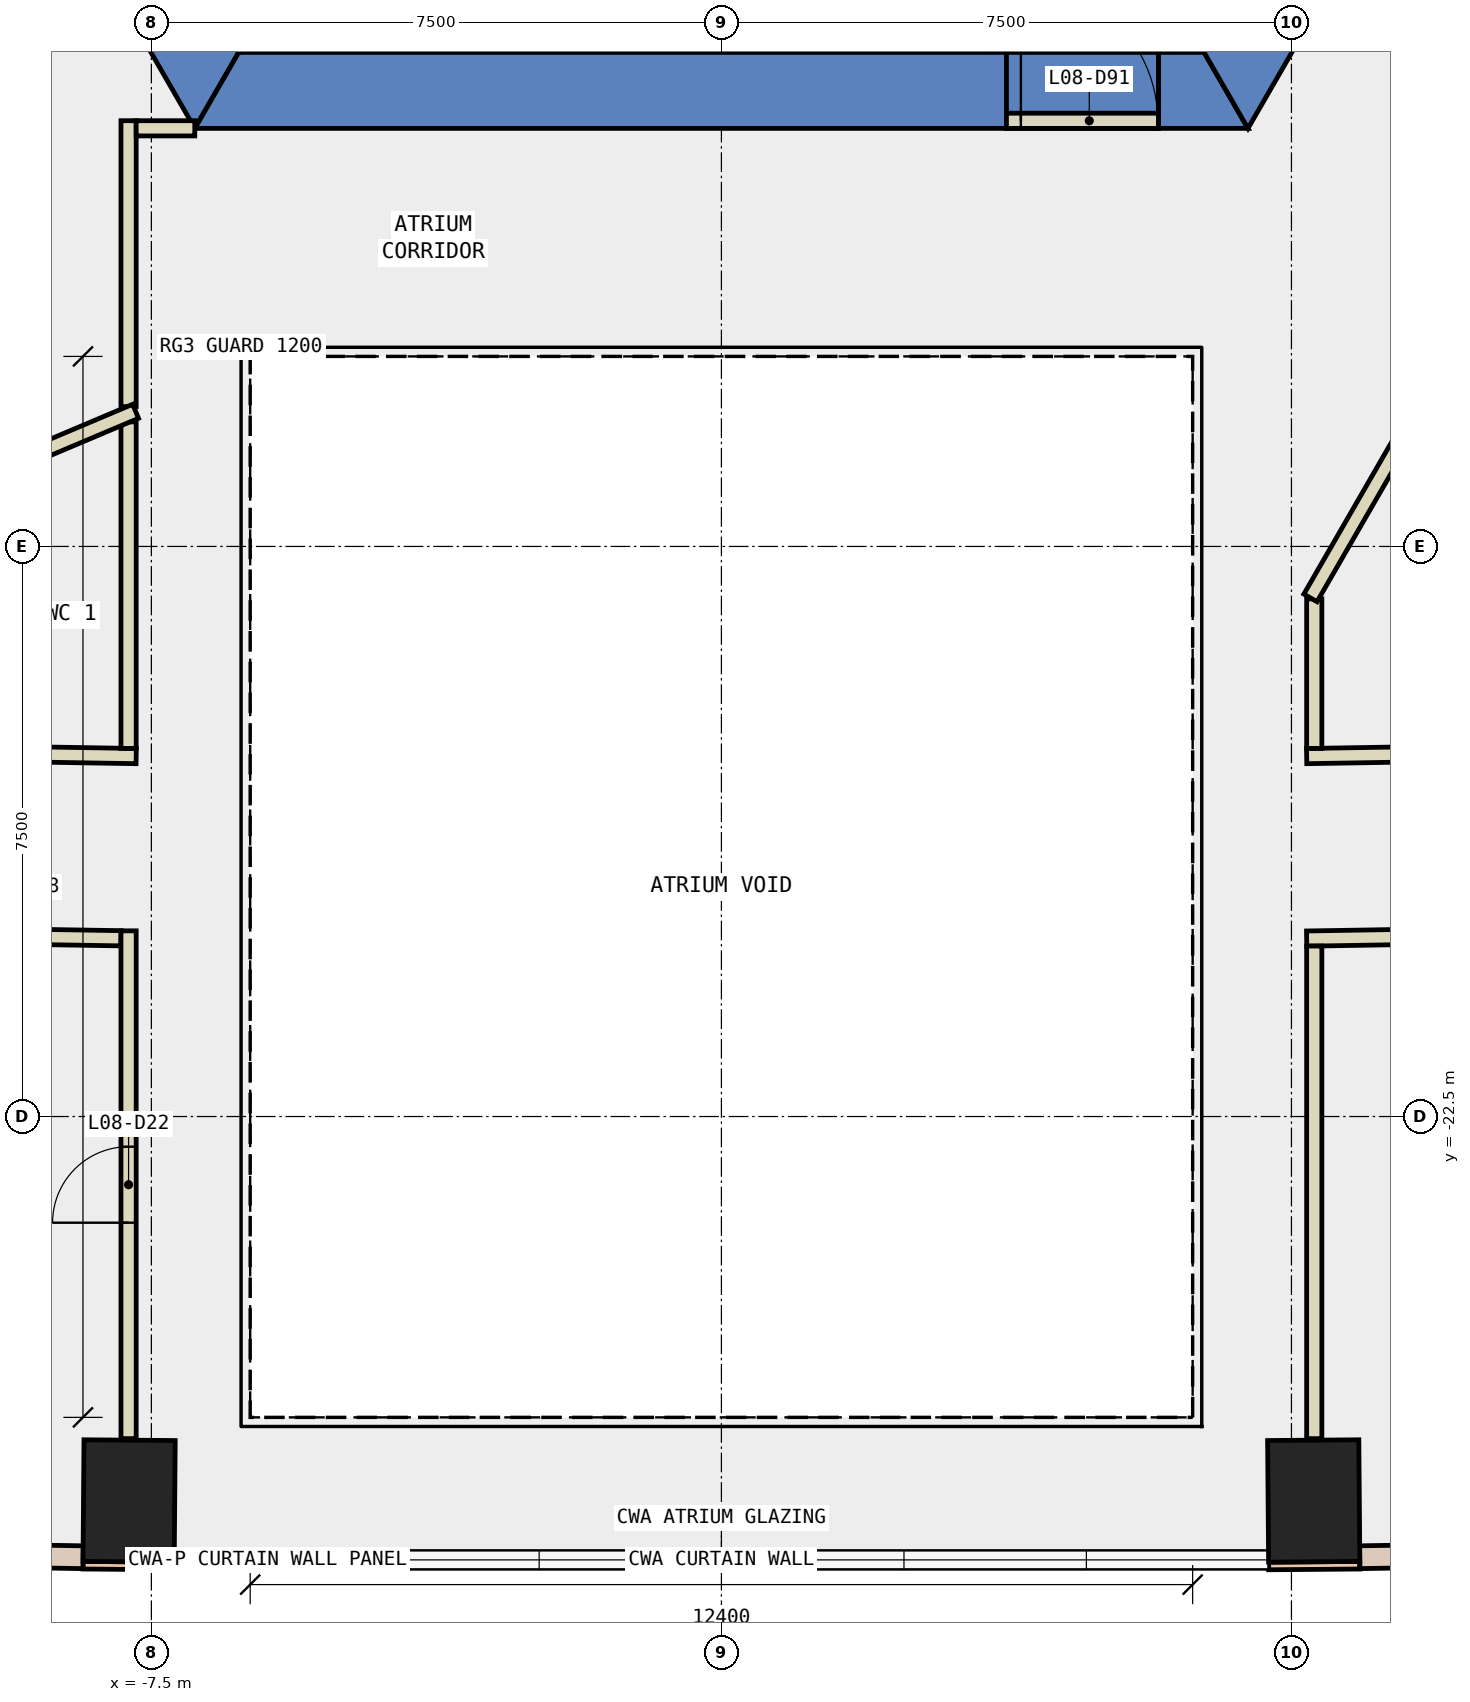
"""IFC4 building model, lengths in metres.
Left out: names, types, materials, properties, quantities, classifications, styles, units other than length and angle.
Written with IfcOpenShell. Run it as: python <this file> out.ifc"""

import sys

from ifc_helpers import new_model, si_unit, direction, frame, frame_2d, origin, origin_2d, place, context, subcontext, project, spatial, polyline, rectangle, outline, extrude, element, fill, save


model = new_model("IFC4")
c1 = context("Model", 3, precision=1e-05, world=origin(), true_north=direction((0.0, 1.0)))
c2 = subcontext(c1, "Body", "Model", "MODEL_VIEW")
j1 = project(units=[si_unit("LENGTHUNIT", "METRE"), si_unit("PLANEANGLEUNIT", "RADIAN")], contexts=[c1])
p1 = place(None, origin())
s1 = spatial("IfcSite", under=j1, at=p1, CompositionType="ELEMENT")
p2 = place(p1, origin())
s2 = spatial("IfcBuilding", under=s1, at=p2, CompositionType="ELEMENT")
p3 = place(p2, frame((0.0, 0.0, 43.4)))
s3 = spatial("IfcBuildingStorey", under=s2, at=p3, CompositionType="ELEMENT", Elevation=43.4)
for number, where, z_axis, x_axis in (
    (1, (-7.793, -27.558, -0.4), (0.0, 0.0, 1.0), (-1.0, 0.008, 0.0)),
    (2, (7.793, -27.558, -0.4), (0.0, 0.0, 1.0), (1.0, 0.008, 0.0)),
):
    element("IfcColumn", number, at=place(p3, frame(where, z_axis=z_axis, x_axis=x_axis)), inside=s3, PredefinedType="COLUMN", context=c2, shape_type="SweptSolid", body=[
        extrude(rectangle(XDim=1.2, YDim=1.6, at=origin_2d()), origin(), (0.0, 0.0, 1.0), 4.2),
    ])
p4 = place(p3, frame((0.0, 0.0, -0.4)))
e3 = element("IfcWall", 3, at=p4, inside=s3, PredefinedType="SHEAR", context=c2, shape_type="SweptSolid", body=[
    extrude(outline(polyline([(-13.856, 2.5), (-6.928, -9.5), (-6.351, -8.5), (-12.702, 2.5), (-13.856, 2.5)])), origin(), (0.0, 0.0, 1.0), 4.2),
])
p5 = place(p3, frame((0.0, 0.0, -0.4)))
e4 = element("IfcWall", 4, at=p5, inside=s3, PredefinedType="SHEAR", context=c2, shape_type="SweptSolid", body=[
    extrude(outline(polyline([(3.75, -9.5), (3.75, -8.5), (-6.351, -8.5), (-6.928, -9.5), (3.75, -9.5)])), origin(), (0.0, 0.0, 1.0), 4.2),
])
p6 = place(p3, frame((0.0, 0.0, -0.4)))
e5 = element("IfcWall", 5, at=p6, inside=s3, PredefinedType="SHEAR", context=c2, shape_type="SweptSolid", body=[
    extrude(outline(polyline([(5.75, -8.5), (5.75, -9.5), (6.928, -9.5), (6.351, -8.5), (5.75, -8.5)])), origin(), (0.0, 0.0, 1.0), 4.2),
])
p7 = place(p3, frame((0.0, 0.0, 3.6)))
e6 = element("IfcWall", 6, at=p7, inside=s3, PredefinedType="SHEAR", context=c2, shape_type="SweptSolid", body=[
    extrude(outline(polyline([(5.75, -9.5), (5.75, -8.5), (3.75, -8.5), (3.75, -9.5), (5.75, -9.5)])), origin(), (0.0, 0.0, 1.0), 0.2),
])
p8 = place(p3, frame((0.0, 0.0, -0.4)))
e7 = element("IfcWall", 7, at=p8, inside=s3, PredefinedType="SHEAR", context=c2, shape_type="SweptSolid", body=[
    extrude(outline(polyline([(8.117, -7.44), (7.252, -6.94), (6.351, -8.5), (6.928, -9.5), (8.117, -7.44)])), origin(), (0.0, 0.0, 1.0), 4.2),
])
for number, where, z_axis, x_axis in (
    (8, (-8.4, -28.403, 0.0), (0.0, 0.0, 1.0), (1.0, -0.008, 0.0)),
    (9, (7.2, -28.413, 0.0), (0.0, 0.0, 1.0), (1.0, 0.008, 0.0)),
):
    element("IfcWall", number, at=place(p3, frame(where, z_axis=z_axis, x_axis=x_axis)), inside=s3, PredefinedType="STANDARD", context=c2, shape_type="SweptSolid", body=[
        extrude(rectangle(XDim=1.2, YDim=0.1, at=frame_2d((0.6, 0.0))), origin(), (0.0, 0.0, 1.0), 3.8),
    ])
p9 = place(p3, frame((-15.568, -28.181, 0.0), z_axis=(0.0, 0.0, 1.0), x_axis=(0.999866467443, -0.016341581408, 0.0)))
e10 = element("IfcWall", 10, at=p9, inside=s3, PredefinedType="STANDARD", context=c2, shape_type="SweptSolid", body=[
    extrude(rectangle(XDim=7.171, YDim=0.3, at=frame_2d((3.585, 0.0))), origin(), (0.0, 0.0, 1.0), 3.8),
])
p10 = place(p9, frame((0.593, 0.0, 0.9)))
e11 = element("IfcOpeningElement", 11, at=p10, cuts=e10, PredefinedType="OPENING", context=c2, shape_type="SweptSolid", body=[
    extrude(rectangle(XDim=2.4, YDim=2.6, at=frame_2d((1.2, 1.3))), frame((0.0, 0.16, 0.0), z_axis=(0.0, -1.0, 0.0), x_axis=(1.0, 0.0, 0.0)), (0.0, 0.0, 1.0), 0.32),
])
p11 = place(p9, frame((4.178, 0.0, 0.9)))
e12 = element("IfcOpeningElement", 12, at=p11, cuts=e10, PredefinedType="OPENING", context=c2, shape_type="SweptSolid", body=[
    extrude(rectangle(XDim=2.4, YDim=2.6, at=frame_2d((1.2, 1.3))), frame((0.0, 0.16, 0.0), z_axis=(0.0, -1.0, 0.0), x_axis=(1.0, 0.0, 0.0)), (0.0, 0.0, 1.0), 0.32),
])
p12 = place(p3, frame((8.398, -28.298, 0.0), z_axis=(0.0, 0.0, 1.0), x_axis=(0.999866467443, 0.016341581408, 0.0)))
e13 = element("IfcWall", 13, at=p12, inside=s3, PredefinedType="STANDARD", context=c2, shape_type="SweptSolid", body=[
    extrude(rectangle(XDim=7.171, YDim=0.3, at=frame_2d((3.585, 0.0))), origin(), (0.0, 0.0, 1.0), 3.8),
])
p13 = place(p12, frame((0.593, 0.0, 0.9)))
e14 = element("IfcOpeningElement", 14, at=p13, cuts=e13, PredefinedType="OPENING", context=c2, shape_type="SweptSolid", body=[
    extrude(rectangle(XDim=2.4, YDim=2.6, at=frame_2d((1.2, 1.3))), frame((0.0, 0.16, 0.0), z_axis=(0.0, -1.0, 0.0), x_axis=(1.0, 0.0, 0.0)), (0.0, 0.0, 1.0), 0.32),
])
p14 = place(p12, frame((4.178, 0.0, 0.9)))
e15 = element("IfcOpeningElement", 15, at=p14, cuts=e13, PredefinedType="OPENING", context=c2, shape_type="SweptSolid", body=[
    extrude(rectangle(XDim=2.4, YDim=2.6, at=frame_2d((1.2, 1.3))), frame((0.0, 0.16, 0.0), z_axis=(0.0, -1.0, 0.0), x_axis=(1.0, 0.0, 0.0)), (0.0, 0.0, 1.0), 0.32),
])
p15 = place(p3, frame((7.7, -17.758, 0.0), z_axis=(0.0, 0.0, 1.0), x_axis=(0.999865574926, 0.016396099485, 0.0)))
e16 = element("IfcWall", 16, at=p15, inside=s3, PredefinedType="PARTITIONING", context=c2, shape_type="SweptSolid", body=[
    extrude(rectangle(XDim=8.234, YDim=0.2, at=frame_2d((4.117, 0.0))), origin(), (0.0, 0.0, 1.0), 3.8),
])
p16 = place(p3, frame((-15.73, -17.627, 0.0), z_axis=(0.0, 0.0, 1.0), x_axis=(0.999866746812, -0.016324479129, 0.0)))
e17 = element("IfcWall", 17, at=p16, inside=s3, PredefinedType="PARTITIONING", context=c2, shape_type="SweptSolid", body=[
    extrude(rectangle(XDim=8.031, YDim=0.2, at=frame_2d((4.016, 0.0))), origin(), (0.0, 0.0, 1.0), 3.8),
])
p17 = place(p16, frame((3.515, 0.0, 0.0)))
e18 = element("IfcOpeningElement", 18, at=p17, cuts=e17, PredefinedType="OPENING", context=c2, shape_type="SweptSolid", body=[
    extrude(rectangle(XDim=1.0, YDim=2.1, at=frame_2d((0.5, 1.05))), frame((0.0, 0.11, 0.0), z_axis=(0.0, -1.0, 0.0), x_axis=(1.0, 0.0, 0.0)), (0.0, 0.0, 1.0), 0.22),
])
p18 = place(p3, frame((16.061, -20.022, 0.0), z_axis=(0.0, 0.0, 1.0), x_axis=(-0.999865858466, -0.016378799504, 0.0)))
e19 = element("IfcWall", 19, at=p18, inside=s3, PredefinedType="PARTITIONING", context=c2, shape_type="SweptSolid", body=[
    extrude(rectangle(XDim=8.362, YDim=0.2, at=frame_2d((4.181, 0.0))), origin(), (0.0, 0.0, 1.0), 3.8),
])
p19 = place(p18, frame((3.681, 0.0, 0.0)))
e20 = element("IfcOpeningElement", 20, at=p19, cuts=e19, PredefinedType="OPENING", context=c2, shape_type="SweptSolid", body=[
    extrude(rectangle(XDim=1.0, YDim=2.1, at=frame_2d((0.5, 1.05))), frame((0.0, 0.11, 0.0), z_axis=(0.0, -1.0, 0.0), x_axis=(1.0, 0.0, 0.0)), (0.0, 0.0, 1.0), 0.22),
])
p20 = place(p3, frame((-7.9, -20.155, 0.0), z_axis=(0.0, 0.0, 1.0), x_axis=(-0.999867846419, 0.016256989184, 0.0)))
e21 = element("IfcWall", 21, at=p20, inside=s3, PredefinedType="PARTITIONING", context=c2, shape_type="SweptSolid", body=[
    extrude(rectangle(XDim=3.875, YDim=0.2, at=frame_2d((1.937, 0.0))), origin(), (0.0, 0.0, 1.0), 3.8),
])
p21 = place(p3, frame((7.8, -15.69, 0.0), z_axis=(0.0, 0.0, 1.0), x_axis=(0.0, -1.0, 0.0)))
e22 = element("IfcWall", 22, at=p21, inside=s3, PredefinedType="PARTITIONING", context=c2, shape_type="SweptSolid", body=[
    extrude(rectangle(XDim=1.967, YDim=0.2, at=frame_2d((0.983, 0.0))), origin(), (0.0, 0.0, 1.0), 3.8),
])
p22 = place(p3, frame((-7.8, -13.161, 0.0), z_axis=(0.0, 0.0, 1.0), x_axis=(0.0, 1.0, 0.0)))
e23 = element("IfcWall", 23, at=p22, inside=s3, PredefinedType="PARTITIONING", context=c2, shape_type="SweptSolid", body=[
    extrude(rectangle(XDim=3.762, YDim=0.2, at=frame_2d((1.881, 0.0))), origin(), (0.0, 0.0, 1.0), 3.8),
])
p23 = place(p3, frame((-7.7, -9.499, 0.0), z_axis=(0.0, 0.0, 1.0), x_axis=(1.0, 0.0, 0.0)))
e24 = element("IfcWall", 24, at=p23, inside=s3, PredefinedType="PARTITIONING", context=c2, shape_type="SweptSolid", body=[
    extrude(rectangle(XDim=0.771, YDim=0.2, at=frame_2d((0.385, 0.0))), origin(), (0.0, 0.0, 1.0), 3.8),
])
p24 = place(p3, frame((-7.8, -17.657, 0.0), z_axis=(0.0, 0.0, 1.0), x_axis=(0.0, 1.0, 0.0)))
e25 = element("IfcWall", 25, at=p24, inside=s3, PredefinedType="PARTITIONING", context=c2, shape_type="SweptSolid", body=[
    extrude(rectangle(XDim=4.296, YDim=0.2, at=frame_2d((2.148, 0.0))), origin(), (0.0, 0.0, 1.0), 3.8),
])
p25 = place(p3, frame((7.8, -20.257, 0.0), z_axis=(0.0, 0.0, 1.0), x_axis=(0.0, -1.0, 0.0)))
e26 = element("IfcWall", 26, at=p25, inside=s3, PredefinedType="PARTITIONING", context=c2, shape_type="SweptSolid", body=[
    extrude(rectangle(XDim=6.481, YDim=0.2, at=frame_2d((3.24, 0.0))), origin(), (0.0, 0.0, 1.0), 3.8),
])
p26 = place(p3, frame((-7.8, -26.738, 0.0), z_axis=(0.0, 0.0, 1.0), x_axis=(0.0, 1.0, 0.0)))
e27 = element("IfcWall", 27, at=p26, inside=s3, PredefinedType="PARTITIONING", context=c2, shape_type="SweptSolid", body=[
    extrude(rectangle(XDim=6.681, YDim=0.2, at=frame_2d((3.341, 0.0))), origin(), (0.0, 0.0, 1.0), 3.8),
])
p27 = place(p26, frame((2.841, 0.0, 0.0)))
e28 = element("IfcOpeningElement", 28, at=p27, cuts=e27, PredefinedType="OPENING", context=c2, shape_type="SweptSolid", body=[
    extrude(rectangle(XDim=1.0, YDim=2.1, at=frame_2d((0.5, 1.05))), frame((0.0, 0.11, 0.0), z_axis=(0.0, -1.0, 0.0), x_axis=(1.0, 0.0, 0.0)), (0.0, 0.0, 1.0), 0.22),
])
p28 = place(p3, frame((-7.708, -13.222, 0.0), z_axis=(0.0, 0.0, 1.0), x_axis=(-0.921093468555, -0.389341523839, 0.0)))
e29 = element("IfcWall", 29, at=p28, inside=s3, PredefinedType="PARTITIONING", context=c2, shape_type="SweptSolid", body=[
    extrude(rectangle(XDim=9.233, YDim=0.2, at=frame_2d((4.617, 0.0))), origin(), (0.0, 0.0, 1.0), 3.8),
])
p29 = place(p3, frame((3.75, -9.4, 0.0), z_axis=(0.0, 0.0, 1.0), x_axis=(1.0, 0.0, 0.0)))
e30 = element("IfcWall", 30, at=p29, inside=s3, PredefinedType="PARTITIONING", context=c2, shape_type="SweptSolid", body=[
    extrude(rectangle(XDim=2.0, YDim=0.2, at=frame_2d((1.0, 0.0))), origin(), (0.0, 0.0, 1.0), 2.4),
])
p30 = place(p29, frame((0.19, 0.0, 0.0)))
e31 = element("IfcOpeningElement", 31, at=p30, cuts=e30, PredefinedType="OPENING", context=c2, shape_type="SweptSolid", body=[
    extrude(rectangle(XDim=1.8, YDim=2.1, at=frame_2d((0.9, 1.05))), frame((0.0, 0.11, 0.0), z_axis=(0.0, -1.0, 0.0), x_axis=(1.0, 0.0, 0.0)), (0.0, 0.0, 1.0), 0.22),
])
p31 = place(p3, frame((12.401, -7.621, 0.0), z_axis=(0.0, 0.0, 1.0), x_axis=(-0.499983724212, -0.866034800411, 0.0)))
e32 = element("IfcWall", 32, at=p31, inside=s3, PredefinedType="PARTITIONING", context=c2, shape_type="SweptSolid", body=[
    extrude(rectangle(XDim=9.302, YDim=0.2, at=frame_2d((4.651, 0.0))), origin(), (0.0, 0.0, 1.0), 3.8),
])
p32 = place(p31, frame((1.429, 0.0, 0.0)))
e33 = element("IfcOpeningElement", 33, at=p32, cuts=e32, PredefinedType="OPENING", context=c2, shape_type="SweptSolid", body=[
    extrude(rectangle(XDim=1.0, YDim=2.1, at=frame_2d((0.5, 1.05))), frame((0.0, 0.11, 0.0), z_axis=(0.0, -1.0, 0.0), x_axis=(1.0, 0.0, 0.0)), (0.0, 0.0, 1.0), 0.22),
])
p33 = place(p31, frame((2.529, 0.0, 0.0)))
e34 = element("IfcOpeningElement", 34, at=p33, cuts=e32, PredefinedType="OPENING", context=c2, shape_type="SweptSolid", body=[
    extrude(rectangle(XDim=1.0, YDim=2.1, at=frame_2d((0.5, 1.05))), frame((0.0, 0.11, 0.0), z_axis=(0.0, -1.0, 0.0), x_axis=(1.0, 0.0, 0.0)), (0.0, 0.0, 1.0), 0.22),
])
p34 = place(p27, origin())
e35 = element("IfcDoor", 35, at=p34, inside=s3, OperationType="SINGLE_SWING_LEFT", PredefinedType="DOOR", context=c2, shape_type="SweptSolid", body=[
    extrude(rectangle(XDim=1.0, YDim=2.1, at=frame_2d((0.5, 1.05))), frame((0.0, 0.025, 0.0), z_axis=(0.0, -1.0, 0.0), x_axis=(1.0, 0.0, 0.0)), (0.0, 0.0, 1.0), 0.05),
])
fill(e28, e35)
p35 = place(p30, origin())
e36 = element("IfcDoor", 36, at=p35, inside=s3, OperationType="DOUBLE_DOOR_SINGLE_SWING", PredefinedType="DOOR", context=c2, shape_type="SweptSolid", body=[
    extrude(rectangle(XDim=1.8, YDim=2.1, at=frame_2d((0.9, 1.05))), frame((0.0, 0.025, 0.0), z_axis=(0.0, -1.0, 0.0), x_axis=(1.0, 0.0, 0.0)), (0.0, 0.0, 1.0), 0.05),
])
fill(e31, e36)
save(model, sys.argv[1])
